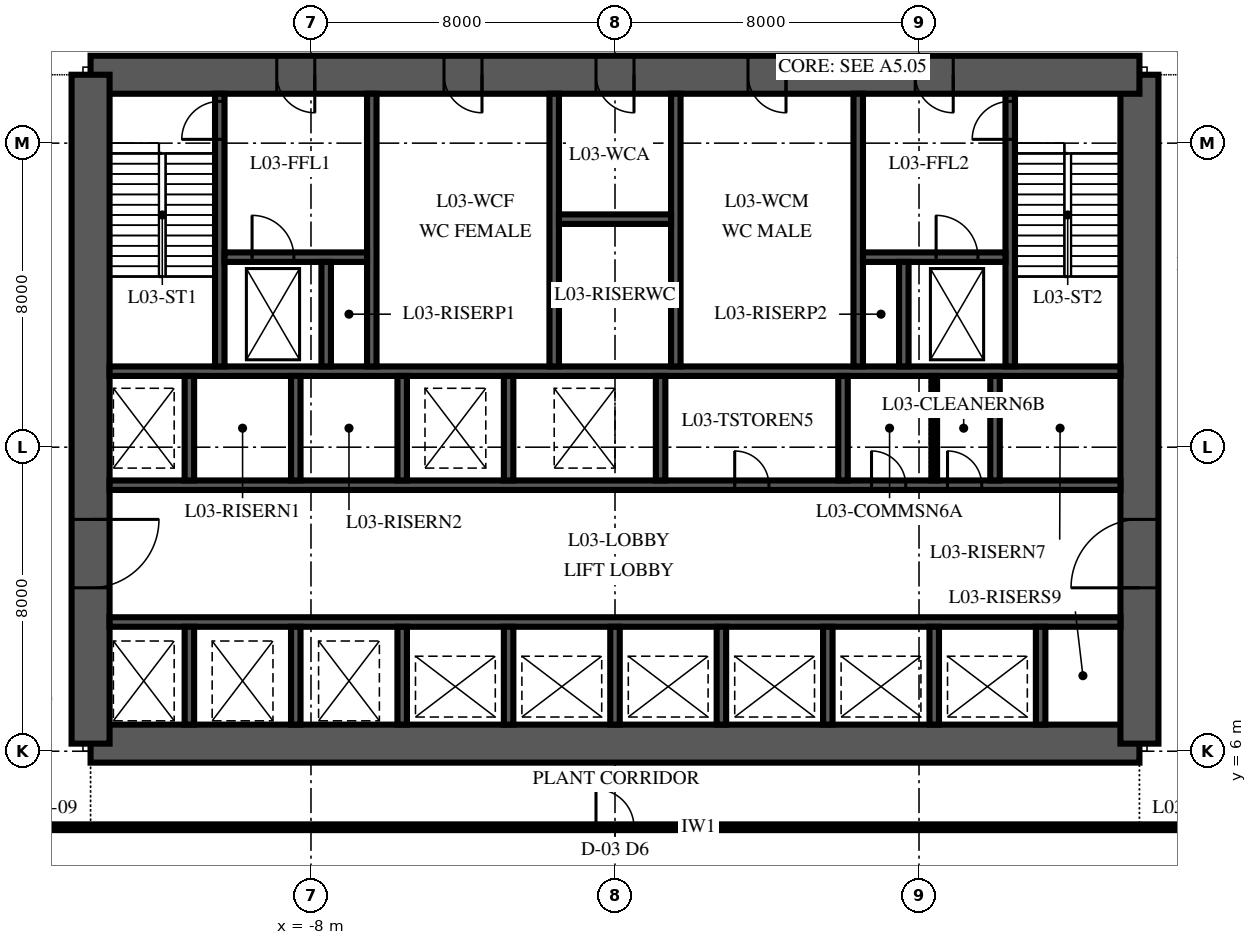
"""IFC4 building model, lengths in metres.
Left out: names, types, materials, properties, quantities, classifications, styles, units other than length and angle.
Written with IfcOpenShell. Run it as: python <this file> out.ifc"""

import sys

from ifc_helpers import new_model, si_unit, direction, frame, frame_2d, origin, place, context, subcontext, project, spatial, polyline, rectangle, outline, extrude, element, fill, save


model = new_model("IFC4")
c1 = context("Model", 3, precision=1e-05, world=origin(), true_north=direction((0.0, 1.0)))
c2 = subcontext(c1, "Body", "Model", "MODEL_VIEW")
j1 = project(units=[si_unit("LENGTHUNIT", "METRE"), si_unit("PLANEANGLEUNIT", "RADIAN")], contexts=[c1])
p1 = place(None, origin())
s1 = spatial("IfcSite", under=j1, at=p1, CompositionType="ELEMENT")
p2 = place(p1, origin())
s2 = spatial("IfcBuilding", under=s1, at=p2, CompositionType="ELEMENT")
p3 = place(p2, frame((0.0, 0.0, 19.0)))
s3 = spatial("IfcBuildingStorey", under=s2, at=p3, CompositionType="ELEMENT", Elevation=19.0)
p4 = place(p3, frame((-13.8, 6.2, 0.0), z_axis=(0.0, 0.0, 1.0), x_axis=(1.0, 0.0, 0.0)))
e1 = element("IfcWall", 1, at=p4, inside=s3, PredefinedType="SHEAR", context=c2, shape_type="SweptSolid", body=[
    extrude(rectangle(XDim=27.6, YDim=1.0, at=frame_2d((13.8, 0.0))), origin(), (0.0, 0.0, 1.0), 9.0),
])
p5 = place(p3, frame((13.8, 6.2, 0.0), z_axis=(0.0, 0.0, 1.0), x_axis=(0.0, 1.0, 0.0)))
e2 = element("IfcWall", 2, at=p5, inside=s3, PredefinedType="SHEAR", context=c2, shape_type="SweptSolid", body=[
    extrude(outline(polyline([(0.0, -0.5), (17.6, -0.5), (17.6, 0.0), (17.1, 0.0), (17.1, 0.5), (0.5, 0.5), (0.5, 0.0), (0.0, 0.0), (0.0, -0.5)])), origin(), (0.0, 0.0, 1.0), 9.0),
])
p6 = place(p5, frame((4.1, 0.0, 0.0)))
e3 = element("IfcOpeningElement", 3, at=p6, cuts=e2, PredefinedType="OPENING", context=c2, shape_type="SweptSolid", body=[
    extrude(rectangle(XDim=1.8, YDim=2.4, at=frame_2d((0.9, 1.2))), frame((0.0, 0.515, 0.0), z_axis=(0.0, -1.0, 0.0), x_axis=(1.0, 0.0, 0.0)), (0.0, 0.0, 1.0), 1.03),
])
p7 = place(p3, frame((13.8, 23.8, 0.0), z_axis=(0.0, 0.0, 1.0), x_axis=(-1.0, 0.0, 0.0)))
e4 = element("IfcWall", 4, at=p7, inside=s3, PredefinedType="SHEAR", context=c2, shape_type="SweptSolid", body=[
    extrude(rectangle(XDim=27.6, YDim=1.0, at=frame_2d((13.8, 0.0))), origin(), (0.0, 0.0, 1.0), 9.0),
])
p8 = place(p7, frame((21.7, 0.0, 0.0)))
e5 = element("IfcOpeningElement", 5, at=p8, cuts=e4, PredefinedType="OPENING", context=c2, shape_type="SweptSolid", body=[
    extrude(rectangle(XDim=1.0, YDim=2.1, at=frame_2d((0.5, 1.05))), frame((0.0, 0.515, 0.0), z_axis=(0.0, -1.0, 0.0), x_axis=(1.0, 0.0, 0.0)), (0.0, 0.0, 1.0), 1.03),
])
p9 = place(p7, frame((4.9, 0.0, 0.0)))
e6 = element("IfcOpeningElement", 6, at=p9, cuts=e4, PredefinedType="OPENING", context=c2, shape_type="SweptSolid", body=[
    extrude(rectangle(XDim=1.0, YDim=2.1, at=frame_2d((0.5, 1.05))), frame((0.0, 0.515, 0.0), z_axis=(0.0, -1.0, 0.0), x_axis=(1.0, 0.0, 0.0)), (0.0, 0.0, 1.0), 1.03),
])
p10 = place(p7, frame((17.3, 0.0, 0.0)))
e7 = element("IfcOpeningElement", 7, at=p10, cuts=e4, PredefinedType="OPENING", context=c2, shape_type="SweptSolid", body=[
    extrude(rectangle(XDim=1.0, YDim=2.1, at=frame_2d((0.5, 1.05))), frame((0.0, 0.515, 0.0), z_axis=(0.0, -1.0, 0.0), x_axis=(1.0, 0.0, 0.0)), (0.0, 0.0, 1.0), 1.03),
])
p11 = place(p7, frame((13.3, 0.0, 0.0)))
e8 = element("IfcOpeningElement", 8, at=p11, cuts=e4, PredefinedType="OPENING", context=c2, shape_type="SweptSolid", body=[
    extrude(rectangle(XDim=1.0, YDim=2.1, at=frame_2d((0.5, 1.05))), frame((0.0, 0.515, 0.0), z_axis=(0.0, -1.0, 0.0), x_axis=(1.0, 0.0, 0.0)), (0.0, 0.0, 1.0), 1.03),
])
p12 = place(p7, frame((9.3, 0.0, 0.0)))
e9 = element("IfcOpeningElement", 9, at=p12, cuts=e4, PredefinedType="OPENING", context=c2, shape_type="SweptSolid", body=[
    extrude(rectangle(XDim=1.0, YDim=2.1, at=frame_2d((0.5, 1.05))), frame((0.0, 0.515, 0.0), z_axis=(0.0, -1.0, 0.0), x_axis=(1.0, 0.0, 0.0)), (0.0, 0.0, 1.0), 1.03),
])
p13 = place(p3, frame((-13.8, 23.8, 0.0), z_axis=(0.0, 0.0, 1.0), x_axis=(0.0, -1.0, 0.0)))
e10 = element("IfcWall", 10, at=p13, inside=s3, PredefinedType="SHEAR", context=c2, shape_type="SweptSolid", body=[
    extrude(outline(polyline([(0.0, -0.5), (17.6, -0.5), (17.6, 0.0), (17.1, 0.0), (17.1, 0.5), (0.5, 0.5), (0.5, 0.0), (0.0, 0.0), (0.0, -0.5)])), origin(), (0.0, 0.0, 1.0), 9.0),
])
p14 = place(p13, frame((11.7, 0.0, 0.0)))
e11 = element("IfcOpeningElement", 11, at=p14, cuts=e10, PredefinedType="OPENING", context=c2, shape_type="SweptSolid", body=[
    extrude(rectangle(XDim=1.8, YDim=2.4, at=frame_2d((0.9, 1.2))), frame((0.0, 0.515, 0.0), z_axis=(0.0, -1.0, 0.0), x_axis=(1.0, 0.0, 0.0)), (0.0, 0.0, 1.0), 1.03),
])
p15 = place(p3, frame((-13.3, 9.4, 0.0), z_axis=(0.0, 0.0, 1.0), x_axis=(1.0, 0.0, 0.0)))
e12 = element("IfcWall", 12, at=p15, inside=s3, PredefinedType="SHEAR", context=c2, shape_type="SweptSolid", body=[
    extrude(rectangle(XDim=26.6, YDim=0.25, at=frame_2d((13.3, 0.0))), origin(), (0.0, 0.0, 1.0), 9.0),
])
p16 = place(p3, frame((-13.3, 13.0, 0.0), z_axis=(0.0, 0.0, 1.0), x_axis=(1.0, 0.0, 0.0)))
e13 = element("IfcWall", 13, at=p16, inside=s3, PredefinedType="SHEAR", context=c2, shape_type="SweptSolid", body=[
    extrude(rectangle(XDim=26.6, YDim=0.25, at=frame_2d((13.3, 0.0))), origin(), (0.0, 0.0, 1.0), 9.0),
])
p17 = place(p16, frame((16.45, 0.0, 0.0)))
e14 = element("IfcOpeningElement", 14, at=p17, cuts=e13, PredefinedType="OPENING", context=c2, shape_type="SweptSolid", body=[
    extrude(rectangle(XDim=0.9, YDim=2.1, at=frame_2d((0.45, 1.05))), frame((0.0, 0.14, 0.0), z_axis=(0.0, -1.0, 0.0), x_axis=(1.0, 0.0, 0.0)), (0.0, 0.0, 1.0), 0.28),
])
p18 = place(p16, frame((20.05, 0.0, 0.0)))
e15 = element("IfcOpeningElement", 15, at=p18, cuts=e13, PredefinedType="OPENING", context=c2, shape_type="SweptSolid", body=[
    extrude(rectangle(XDim=0.9, YDim=2.1, at=frame_2d((0.45, 1.05))), frame((0.0, 0.14, 0.0), z_axis=(0.0, -1.0, 0.0), x_axis=(1.0, 0.0, 0.0)), (0.0, 0.0, 1.0), 0.28),
])
p19 = place(p16, frame((22.05, 0.0, 0.0)))
e16 = element("IfcOpeningElement", 16, at=p19, cuts=e13, PredefinedType="OPENING", context=c2, shape_type="SweptSolid", body=[
    extrude(rectangle(XDim=0.9, YDim=2.1, at=frame_2d((0.45, 1.05))), frame((0.0, 0.14, 0.0), z_axis=(0.0, -1.0, 0.0), x_axis=(1.0, 0.0, 0.0)), (0.0, 0.0, 1.0), 0.28),
])
p20 = place(p3, frame((-13.3, 16.0, 0.0), z_axis=(0.0, 0.0, 1.0), x_axis=(1.0, 0.0, 0.0)))
e17 = element("IfcWall", 17, at=p20, inside=s3, PredefinedType="SHEAR", context=c2, shape_type="SweptSolid", body=[
    extrude(rectangle(XDim=26.6, YDim=0.25, at=frame_2d((13.3, 0.0))), origin(), (0.0, 0.0, 1.0), 9.0),
])
for number, where, z_axis, x_axis in (
    (18, (-11.2, 6.7, 0.0), (0.0, 0.0, 1.0), (0.0, 1.0, 0.0)),
    (19, (-8.4, 6.7, 0.0), (0.0, 0.0, 1.0), (0.0, 1.0, 0.0)),
    (20, (-5.6, 6.7, 0.0), (0.0, 0.0, 1.0), (0.0, 1.0, 0.0)),
    (21, (-2.8, 6.7, 0.0), (0.0, 0.0, 1.0), (0.0, 1.0, 0.0)),
    (22, (0.0, 6.7, 0.0), (0.0, 0.0, 1.0), (0.0, 1.0, 0.0)),
    (23, (2.8, 6.7, 0.0), (0.0, 0.0, 1.0), (0.0, 1.0, 0.0)),
    (24, (5.6, 6.7, 0.0), (0.0, 0.0, 1.0), (0.0, 1.0, 0.0)),
    (25, (8.4, 6.7, 0.0), (0.0, 0.0, 1.0), (0.0, 1.0, 0.0)),
    (26, (11.2, 6.7, 0.0), (0.0, 0.0, 1.0), (0.0, 1.0, 0.0)),
):
    element("IfcWall", number, at=place(p3, frame(where, z_axis=z_axis, x_axis=x_axis)), inside=s3, PredefinedType="SHEAR", context=c2, shape_type="SweptSolid", body=[
        extrude(rectangle(XDim=2.575, YDim=0.25, at=frame_2d((1.288, 0.0))), origin(), (0.0, 0.0, 1.0), 9.0),
    ])
for number, where, z_axis, x_axis in (
    (27, (-11.2, 13.125, 0.0), (0.0, 0.0, 1.0), (0.0, 1.0, 0.0)),
    (28, (-8.4, 13.125, 0.0), (0.0, 0.0, 1.0), (0.0, 1.0, 0.0)),
    (29, (-5.6, 13.125, 0.0), (0.0, 0.0, 1.0), (0.0, 1.0, 0.0)),
    (30, (-2.8, 13.125, 0.0), (0.0, 0.0, 1.0), (0.0, 1.0, 0.0)),
    (31, (1.2, 13.125, 0.0), (0.0, 0.0, 1.0), (0.0, 1.0, 0.0)),
    (32, (6.0, 13.125, 0.0), (0.0, 0.0, 1.0), (0.0, 1.0, 0.0)),
    (33, (10.0, 13.125, 0.0), (0.0, 0.0, 1.0), (0.0, 1.0, 0.0)),
):
    element("IfcWall", number, at=place(p3, frame(where, z_axis=z_axis, x_axis=x_axis)), inside=s3, PredefinedType="SHEAR", context=c2, shape_type="SweptSolid", body=[
        extrude(rectangle(XDim=2.75, YDim=0.25, at=frame_2d((1.375, 0.0))), origin(), (0.0, 0.0, 1.0), 9.0),
    ])
p21 = place(p3, frame((-10.4, 16.125, 0.0), z_axis=(0.0, 0.0, 1.0), x_axis=(0.0, 1.0, 0.0)))
e34 = element("IfcWall", 34, at=p21, inside=s3, PredefinedType="SHEAR", context=c2, shape_type="SweptSolid", body=[
    extrude(rectangle(XDim=7.175, YDim=0.25, at=frame_2d((3.587, 0.0))), origin(), (0.0, 0.0, 1.0), 9.0),
])
p22 = place(p21, frame((5.975, 0.0, 0.0)))
e35 = element("IfcOpeningElement", 35, at=p22, cuts=e34, PredefinedType="OPENING", context=c2, shape_type="SweptSolid", body=[
    extrude(rectangle(XDim=1.0, YDim=2.1, at=frame_2d((0.5, 1.05))), frame((0.0, 0.14, 0.0), z_axis=(0.0, -1.0, 0.0), x_axis=(1.0, 0.0, 0.0)), (0.0, 0.0, 1.0), 0.28),
])
for number, where, z_axis, x_axis in (
    (36, (-6.4, 16.125, 0.0), (0.0, 0.0, 1.0), (0.0, 1.0, 0.0)),
    (37, (-1.6, 16.125, 0.0), (0.0, 0.0, 1.0), (0.0, 1.0, 0.0)),
    (38, (1.6, 16.125, 0.0), (0.0, 0.0, 1.0), (0.0, 1.0, 0.0)),
    (39, (6.4, 16.125, 0.0), (0.0, 0.0, 1.0), (0.0, 1.0, 0.0)),
):
    element("IfcWall", number, at=place(p3, frame(where, z_axis=z_axis, x_axis=x_axis)), inside=s3, PredefinedType="SHEAR", context=c2, shape_type="SweptSolid", body=[
        extrude(rectangle(XDim=7.175, YDim=0.25, at=frame_2d((3.587, 0.0))), origin(), (0.0, 0.0, 1.0), 9.0),
    ])
p23 = place(p3, frame((10.4, 16.125, 0.0), z_axis=(0.0, 0.0, 1.0), x_axis=(0.0, 1.0, 0.0)))
e40 = element("IfcWall", 40, at=p23, inside=s3, PredefinedType="SHEAR", context=c2, shape_type="SweptSolid", body=[
    extrude(rectangle(XDim=7.175, YDim=0.25, at=frame_2d((3.587, 0.0))), origin(), (0.0, 0.0, 1.0), 9.0),
])
p24 = place(p23, frame((5.975, 0.0, 0.0)))
e41 = element("IfcOpeningElement", 41, at=p24, cuts=e40, PredefinedType="OPENING", context=c2, shape_type="SweptSolid", body=[
    extrude(rectangle(XDim=1.0, YDim=2.1, at=frame_2d((0.5, 1.05))), frame((0.0, 0.14, 0.0), z_axis=(0.0, -1.0, 0.0), x_axis=(1.0, 0.0, 0.0)), (0.0, 0.0, 1.0), 0.28),
])
p25 = place(p3, frame((-10.275, 19.0, 0.0), z_axis=(0.0, 0.0, 1.0), x_axis=(1.0, 0.0, 0.0)))
e42 = element("IfcWall", 42, at=p25, inside=s3, PredefinedType="SHEAR", context=c2, shape_type="SweptSolid", body=[
    extrude(rectangle(XDim=3.75, YDim=0.25, at=frame_2d((1.875, 0.0))), origin(), (0.0, 0.0, 1.0), 9.0),
])
p26 = place(p25, frame((0.725, 0.0, 0.0)))
e43 = element("IfcOpeningElement", 43, at=p26, cuts=e42, PredefinedType="OPENING", context=c2, shape_type="SweptSolid", body=[
    extrude(rectangle(XDim=1.1, YDim=2.1, at=frame_2d((0.55, 1.05))), frame((0.0, 0.14, 0.0), z_axis=(0.0, -1.0, 0.0), x_axis=(1.0, 0.0, 0.0)), (0.0, 0.0, 1.0), 0.28),
])
p27 = place(p3, frame((6.525, 19.0, 0.0), z_axis=(0.0, 0.0, 1.0), x_axis=(1.0, 0.0, 0.0)))
e44 = element("IfcWall", 44, at=p27, inside=s3, PredefinedType="SHEAR", context=c2, shape_type="SweptSolid", body=[
    extrude(rectangle(XDim=3.75, YDim=0.25, at=frame_2d((1.875, 0.0))), origin(), (0.0, 0.0, 1.0), 9.0),
])
p28 = place(p27, frame((1.925, 0.0, 0.0)))
e45 = element("IfcOpeningElement", 45, at=p28, cuts=e44, PredefinedType="OPENING", context=c2, shape_type="SweptSolid", body=[
    extrude(rectangle(XDim=1.1, YDim=2.1, at=frame_2d((0.55, 1.05))), frame((0.0, 0.14, 0.0), z_axis=(0.0, -1.0, 0.0), x_axis=(1.0, 0.0, 0.0)), (0.0, 0.0, 1.0), 0.28),
])
for number, where, z_axis, x_axis in (
    (46, (-7.6, 16.125, 0.0), (0.0, 0.0, 1.0), (0.0, 1.0, 0.0)),
    (47, (7.6, 16.125, 0.0), (0.0, 0.0, 1.0), (0.0, 1.0, 0.0)),
):
    element("IfcWall", number, at=place(p3, frame(where, z_axis=z_axis, x_axis=x_axis)), inside=s3, PredefinedType="SHEAR", context=c2, shape_type="SweptSolid", body=[
        extrude(rectangle(XDim=2.75, YDim=0.25, at=frame_2d((1.375, 0.0))), origin(), (0.0, 0.0, 1.0), 9.0),
    ])
p29 = place(p3, frame((-1.475, 20.0, 0.0), z_axis=(0.0, 0.0, 1.0), x_axis=(1.0, 0.0, 0.0)))
e48 = element("IfcWall", 48, at=p29, inside=s3, PredefinedType="SHEAR", context=c2, shape_type="SweptSolid", body=[
    extrude(rectangle(XDim=2.95, YDim=0.25, at=frame_2d((1.475, 0.0))), origin(), (0.0, 0.0, 1.0), 9.0),
])
p30 = place(p3, frame((8.4, 13.125, 0.0), z_axis=(0.0, 0.0, 1.0), x_axis=(0.0, 1.0, 0.0)))
e49 = element("IfcWall", 49, at=p30, inside=s3, PredefinedType="PARTITIONING", context=c2, shape_type="SweptSolid", body=[
    extrude(rectangle(XDim=2.75, YDim=0.15, at=frame_2d((1.375, 0.0))), origin(), (0.0, 0.0, 1.0), 8.85),
])
p31 = place(p3, frame((-26.0, 4.0, 0.0), z_axis=(0.0, 0.0, 1.0), x_axis=(1.0, 0.0, 0.0)))
e50 = element("IfcWall", 50, at=p31, inside=s3, PredefinedType="PARTITIONING", context=c2, shape_type="SweptSolid", body=[
    extrude(rectangle(XDim=52.0, YDim=0.15, at=frame_2d((26.0, 0.0))), origin(), (0.0, 0.0, 1.0), 8.75),
])
p32 = place(p31, frame((25.5, 0.0, 0.0)))
e51 = element("IfcOpeningElement", 51, at=p32, cuts=e50, PredefinedType="OPENING", context=c2, shape_type="SweptSolid", body=[
    extrude(rectangle(XDim=1.0, YDim=2.1, at=frame_2d((0.5, 1.05))), frame((0.0, 0.09, 0.0), z_axis=(0.0, -1.0, 0.0), x_axis=(1.0, 0.0, 0.0)), (0.0, 0.0, 1.0), 0.18),
])
p33 = place(p6, origin())
e52 = element("IfcDoor", 52, at=p33, inside=s3, OperationType="DOUBLE_DOOR_SINGLE_SWING", PredefinedType="DOOR", context=c2, shape_type="SweptSolid", body=[
    extrude(rectangle(XDim=1.8, YDim=2.4, at=frame_2d((0.9, 1.2))), frame((0.0, 0.5, 0.0), z_axis=(0.0, -1.0, 0.0), x_axis=(1.0, 0.0, 0.0)), (0.0, 0.0, 1.0), 1.0),
])
fill(e3, e52)
p34 = place(p14, origin())
e53 = element("IfcDoor", 53, at=p34, inside=s3, OperationType="DOUBLE_DOOR_SINGLE_SWING", PredefinedType="DOOR", context=c2, shape_type="SweptSolid", body=[
    extrude(rectangle(XDim=1.8, YDim=2.4, at=frame_2d((0.9, 1.2))), frame((0.0, 0.5, 0.0), z_axis=(0.0, -1.0, 0.0), x_axis=(1.0, 0.0, 0.0)), (0.0, 0.0, 1.0), 1.0),
])
fill(e11, e53)
p35 = place(p8, origin())
e54 = element("IfcDoor", 54, at=p35, inside=s3, OperationType="SINGLE_SWING_RIGHT", PredefinedType="DOOR", context=c2, shape_type="SweptSolid", body=[
    extrude(rectangle(XDim=1.0, YDim=2.1, at=frame_2d((0.5, 1.05))), frame((0.0, 0.5, 0.0), z_axis=(0.0, -1.0, 0.0), x_axis=(1.0, 0.0, 0.0)), (0.0, 0.0, 1.0), 1.0),
])
fill(e5, e54)
p36 = place(p9, origin())
e55 = element("IfcDoor", 55, at=p36, inside=s3, OperationType="SINGLE_SWING_RIGHT", PredefinedType="DOOR", context=c2, shape_type="SweptSolid", body=[
    extrude(rectangle(XDim=1.0, YDim=2.1, at=frame_2d((0.5, 1.05))), frame((0.0, 0.5, 0.0), z_axis=(0.0, -1.0, 0.0), x_axis=(1.0, 0.0, 0.0)), (0.0, 0.0, 1.0), 1.0),
])
fill(e6, e55)
p37 = place(p10, origin())
e56 = element("IfcDoor", 56, at=p37, inside=s3, OperationType="SINGLE_SWING_LEFT", PredefinedType="DOOR", context=c2, shape_type="SweptSolid", body=[
    extrude(rectangle(XDim=1.0, YDim=2.1, at=frame_2d((0.5, 1.05))), frame((0.0, 0.5, 0.0), z_axis=(0.0, -1.0, 0.0), x_axis=(1.0, 0.0, 0.0)), (0.0, 0.0, 1.0), 1.0),
])
fill(e7, e56)
p38 = place(p11, origin())
e57 = element("IfcDoor", 57, at=p38, inside=s3, OperationType="SINGLE_SWING_LEFT", PredefinedType="DOOR", context=c2, shape_type="SweptSolid", body=[
    extrude(rectangle(XDim=1.0, YDim=2.1, at=frame_2d((0.5, 1.05))), frame((0.0, 0.5, 0.0), z_axis=(0.0, -1.0, 0.0), x_axis=(1.0, 0.0, 0.0)), (0.0, 0.0, 1.0), 1.0),
])
fill(e8, e57)
p39 = place(p12, origin())
e58 = element("IfcDoor", 58, at=p39, inside=s3, OperationType="SINGLE_SWING_LEFT", PredefinedType="DOOR", context=c2, shape_type="SweptSolid", body=[
    extrude(rectangle(XDim=1.0, YDim=2.1, at=frame_2d((0.5, 1.05))), frame((0.0, 0.5, 0.0), z_axis=(0.0, -1.0, 0.0), x_axis=(1.0, 0.0, 0.0)), (0.0, 0.0, 1.0), 1.0),
])
fill(e9, e58)
p40 = place(p22, origin())
e59 = element("IfcDoor", 59, at=p40, inside=s3, OperationType="SINGLE_SWING_LEFT", PredefinedType="DOOR", context=c2, shape_type="SweptSolid", body=[
    extrude(rectangle(XDim=1.0, YDim=2.1, at=frame_2d((0.5, 1.05))), frame((0.0, 0.125, 0.0), z_axis=(0.0, -1.0, 0.0), x_axis=(1.0, 0.0, 0.0)), (0.0, 0.0, 1.0), 0.25),
])
fill(e35, e59)
p41 = place(p24, origin())
e60 = element("IfcDoor", 60, at=p41, inside=s3, OperationType="SINGLE_SWING_LEFT", PredefinedType="DOOR", context=c2, shape_type="SweptSolid", body=[
    extrude(rectangle(XDim=1.0, YDim=2.1, at=frame_2d((0.5, 1.05))), frame((0.0, 0.125, 0.0), z_axis=(0.0, -1.0, 0.0), x_axis=(1.0, 0.0, 0.0)), (0.0, 0.0, 1.0), 0.25),
])
fill(e41, e60)
p42 = place(p28, origin())
e61 = element("IfcDoor", 61, at=p42, inside=s3, OperationType="SLIDING_TO_RIGHT", PredefinedType="DOOR", context=c2, shape_type="SweptSolid", body=[
    extrude(rectangle(XDim=1.1, YDim=2.1, at=frame_2d((0.55, 1.05))), frame((0.0, 0.125, 0.0), z_axis=(0.0, -1.0, 0.0), x_axis=(1.0, 0.0, 0.0)), (0.0, 0.0, 1.0), 0.25),
])
fill(e45, e61)
p43 = place(p26, origin())
e62 = element("IfcDoor", 62, at=p43, inside=s3, OperationType="SLIDING_TO_RIGHT", PredefinedType="DOOR", context=c2, shape_type="SweptSolid", body=[
    extrude(rectangle(XDim=1.1, YDim=2.1, at=frame_2d((0.55, 1.05))), frame((0.0, 0.125, 0.0), z_axis=(0.0, -1.0, 0.0), x_axis=(1.0, 0.0, 0.0)), (0.0, 0.0, 1.0), 0.25),
])
fill(e43, e62)
p44 = place(p17, origin())
e63 = element("IfcDoor", 63, at=p44, inside=s3, OperationType="SINGLE_SWING_LEFT", PredefinedType="DOOR", context=c2, shape_type="SweptSolid", body=[
    extrude(rectangle(XDim=0.9, YDim=2.1, at=frame_2d((0.45, 1.05))), frame((0.0, 0.125, 0.0), z_axis=(0.0, -1.0, 0.0), x_axis=(1.0, 0.0, 0.0)), (0.0, 0.0, 1.0), 0.25),
])
fill(e14, e63)
p45 = place(p18, origin())
e64 = element("IfcDoor", 64, at=p45, inside=s3, OperationType="SINGLE_SWING_LEFT", PredefinedType="DOOR", context=c2, shape_type="SweptSolid", body=[
    extrude(rectangle(XDim=0.9, YDim=2.1, at=frame_2d((0.45, 1.05))), frame((0.0, 0.125, 0.0), z_axis=(0.0, -1.0, 0.0), x_axis=(1.0, 0.0, 0.0)), (0.0, 0.0, 1.0), 0.25),
])
fill(e15, e64)
p46 = place(p19, origin())
e65 = element("IfcDoor", 65, at=p46, inside=s3, OperationType="SINGLE_SWING_LEFT", PredefinedType="DOOR", context=c2, shape_type="SweptSolid", body=[
    extrude(rectangle(XDim=0.9, YDim=2.1, at=frame_2d((0.45, 1.05))), frame((0.0, 0.125, 0.0), z_axis=(0.0, -1.0, 0.0), x_axis=(1.0, 0.0, 0.0)), (0.0, 0.0, 1.0), 0.25),
])
fill(e16, e65)
p47 = place(p32, origin())
e66 = element("IfcDoor", 66, at=p47, inside=s3, OperationType="SINGLE_SWING_LEFT", PredefinedType="DOOR", context=c2, shape_type="SweptSolid", body=[
    extrude(rectangle(XDim=1.0, YDim=2.1, at=frame_2d((0.5, 1.05))), frame((0.0, 0.075, 0.0), z_axis=(0.0, -1.0, 0.0), x_axis=(1.0, 0.0, 0.0)), (0.0, 0.0, 1.0), 0.149),
])
fill(e51, e66)
save(model, sys.argv[1])
